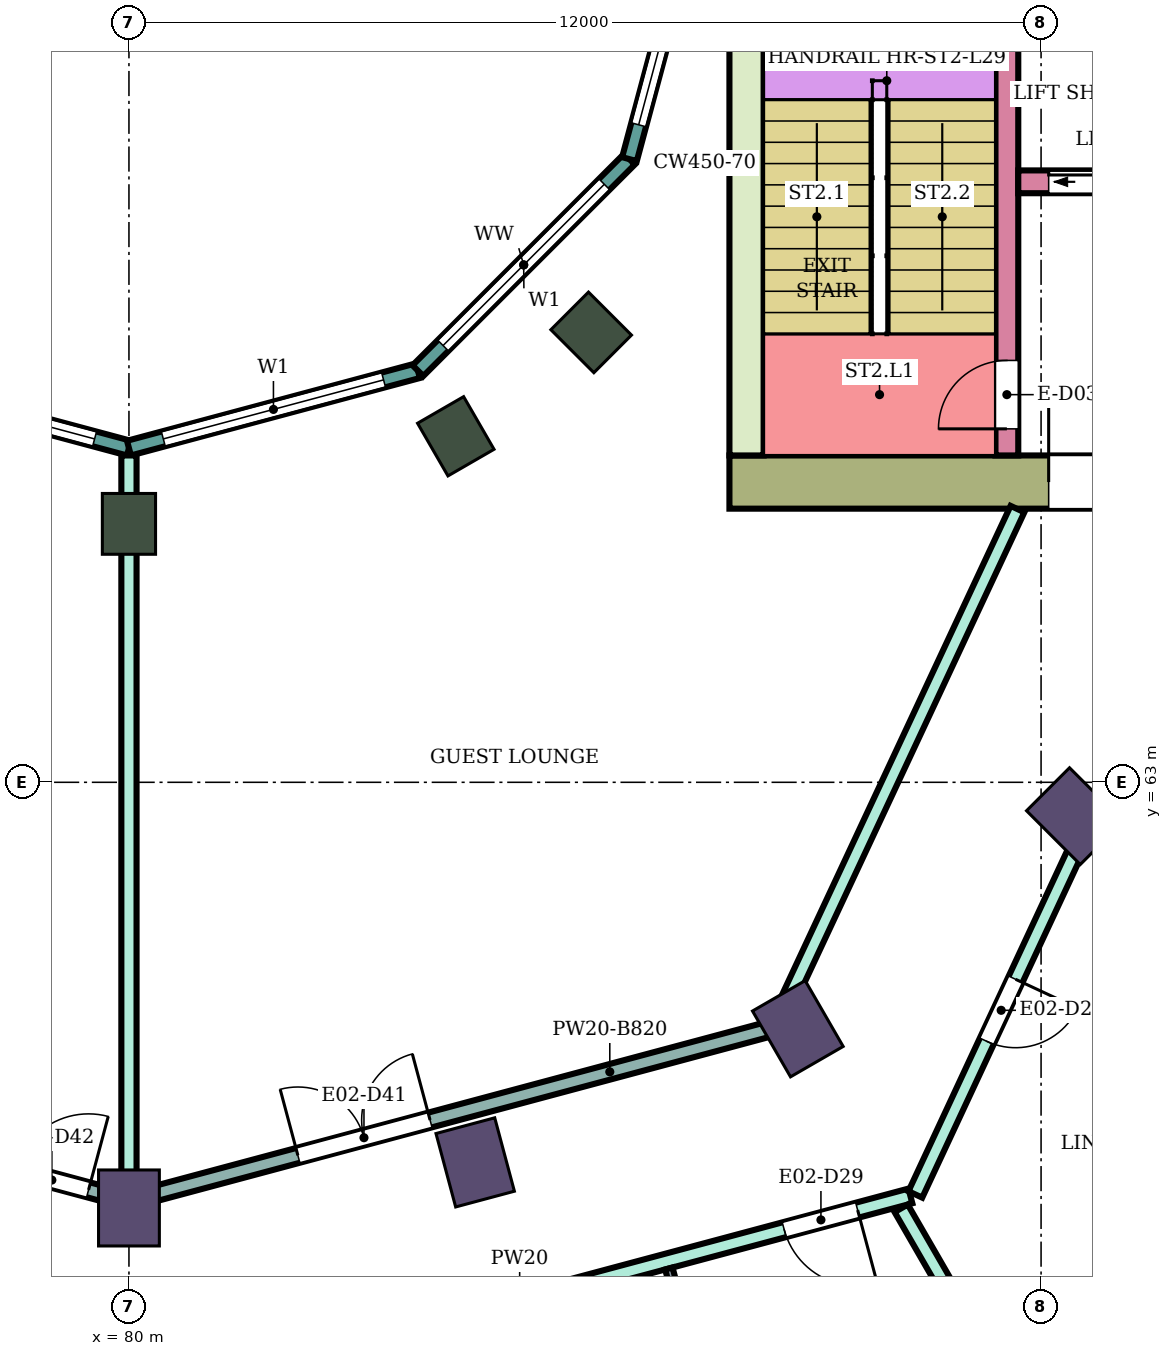
"""IFC4 building model, lengths in metres.
Left out: names, types, materials, properties, quantities, classifications, styles, units other than length and angle.
Written with IfcOpenShell. Run it as: python <this file> out.ifc"""

import sys

from ifc_helpers import new_model, si_unit, direction, frame, frame_2d, origin, origin_2d, place, context, subcontext, project, spatial, rectangle, extrude, element, fill, save


model = new_model("IFC4")
c1 = context("Model", 3, precision=1e-05, world=origin(), true_north=direction((0.0, 1.0)))
c2 = subcontext(c1, "Body", "Model", "MODEL_VIEW")
j1 = project(units=[si_unit("LENGTHUNIT", "METRE"), si_unit("PLANEANGLEUNIT", "RADIAN")], contexts=[c1])
p1 = place(None, origin())
s1 = spatial("IfcSite", under=j1, at=p1, CompositionType="ELEMENT")
p2 = place(p1, origin())
s2 = spatial("IfcBuilding", under=s1, at=p2, CompositionType="ELEMENT")
p3 = place(p2, frame((0.0, 0.0, 126.3)))
s3 = spatial("IfcBuildingStorey", under=s2, at=p3, CompositionType="ELEMENT", Elevation=126.3)
for number, where, z_axis, x_axis in (
    (1, (80.0, 57.4, 0.0), (0.0, 0.0, 1.0), (0.0, -1.0, 0.0)),
    (2, (84.555, 58.0, 0.0), (0.0, 0.0, 1.0), (0.259, -0.966, 0.0)),
    (3, (88.8, 59.758, 0.0), (0.0, 0.0, 1.0), (0.5, -0.866, 0.0)),
    (4, (92.445, 62.555, 0.0), (0.0, 0.0, 1.0), (0.707, -0.707, 0.0)),
):
    element("IfcColumn", number, at=place(p3, frame(where, z_axis=z_axis, x_axis=x_axis)), inside=s3, PredefinedType="COLUMN", context=c2, shape_type="SweptSolid", body=[
        extrude(rectangle(XDim=1.0, YDim=0.8, at=origin_2d()), origin(), (0.0, 0.0, 1.0), 3.9),
    ])
for number, where, z_axis, x_axis in (
    (5, (80.0, 66.4, 0.0), (0.0, 0.0, 1.0), (0.0, -1.0, 0.0)),
    (6, (84.3, 67.552, 0.0), (0.0, 0.0, 1.0), (0.5, -0.866, 0.0)),
    (7, (86.081, 68.919, 0.0), (0.0, 0.0, 1.0), (0.707, -0.707, 0.0)),
):
    element("IfcColumn", number, at=place(p3, frame(where, z_axis=z_axis, x_axis=x_axis)), inside=s3, PredefinedType="COLUMN", context=c2, shape_type="SweptSolid", body=[
        extrude(rectangle(XDim=0.8, YDim=0.7, at=origin_2d()), origin(), (0.0, 0.0, 1.0), 3.9),
    ])
p4 = place(p3, frame((87.9, 66.95, 0.0), z_axis=(0.0, 0.0, 1.0), x_axis=(1.0, 0.0, 0.0)))
e8 = element("IfcWall", 8, at=p4, inside=s3, PredefinedType="SHEAR", context=c2, shape_type="SweptSolid", body=[
    extrude(rectangle(XDim=14.8, YDim=0.7, at=frame_2d((7.4, 0.0))), origin(), (0.0, 0.0, 1.0), 3.58),
])
p5 = place(p4, frame((4.2, 0.0, 0.0)))
e9 = element("IfcOpeningElement", 9, at=p5, cuts=e8, PredefinedType="OPENING", context=c2, shape_type="SweptSolid", body=[
    extrude(rectangle(XDim=2.4, YDim=2.4, at=frame_2d((1.2, 1.2))), frame((0.0, 0.36, 0.0), z_axis=(0.0, -1.0, 0.0), x_axis=(1.0, 0.0, 0.0)), (0.0, 0.0, 1.0), 0.72),
])
p6 = place(p3, frame((88.125, 67.3, 0.0), z_axis=(0.0, 0.0, 1.0), x_axis=(0.0, 1.0, 0.0)))
e10 = element("IfcWall", 10, at=p6, inside=s3, PredefinedType="SHEAR", context=c2, shape_type="SweptSolid", body=[
    extrude(rectangle(XDim=7.7, YDim=0.45, at=frame_2d((3.85, 0.0))), origin(), (0.0, 0.0, 1.0), 3.58),
])
p7 = place(p3, frame((91.55, 67.3, 0.0), z_axis=(0.0, 0.0, 1.0), x_axis=(0.0, 1.0, 0.0)))
e11 = element("IfcWall", 11, at=p7, inside=s3, PredefinedType="SHEAR", context=c2, shape_type="SweptSolid", body=[
    extrude(rectangle(XDim=7.7, YDim=0.3, at=frame_2d((3.85, 0.0))), origin(), (0.0, 0.0, 1.0), 3.58),
])
p8 = place(p7, frame((0.35, 0.0, 0.0)))
e12 = element("IfcOpeningElement", 12, at=p8, cuts=e11, PredefinedType="OPENING", context=c2, shape_type="SweptSolid", body=[
    extrude(rectangle(XDim=0.9, YDim=2.1, at=frame_2d((0.45, 1.05))), frame((0.0, 0.16, 0.0), z_axis=(0.0, -1.0, 0.0), x_axis=(1.0, 0.0, 0.0)), (0.0, 0.0, 1.0), 0.32),
])
p9 = place(p3, frame((91.7, 70.9, 0.0), z_axis=(0.0, 0.0, 1.0), x_axis=(1.0, 0.0, 0.0)))
e13 = element("IfcWall", 13, at=p9, inside=s3, PredefinedType="SHEAR", context=c2, shape_type="SweptSolid", body=[
    extrude(rectangle(XDim=11.0, YDim=0.3, at=frame_2d((5.5, 0.0))), origin(), (0.0, 0.0, 1.0), 3.58),
])
p10 = place(p9, frame((0.4, 0.0, 0.0)))
e14 = element("IfcOpeningElement", 14, at=p10, cuts=e13, PredefinedType="OPENING", context=c2, shape_type="SweptSolid", body=[
    extrude(rectangle(XDim=1.4, YDim=2.1, at=frame_2d((0.7, 1.05))), frame((0.0, 0.16, 0.0), z_axis=(0.0, -1.0, 0.0), x_axis=(1.0, 0.0, 0.0)), (0.0, 0.0, 1.0), 0.32),
])
p11 = place(p9, frame((5.4, 0.0, 0.0)))
e15 = element("IfcOpeningElement", 15, at=p11, cuts=e13, PredefinedType="OPENING", context=c2, shape_type="SweptSolid", body=[
    extrude(rectangle(XDim=1.4, YDim=2.1, at=frame_2d((0.7, 1.05))), frame((0.0, 0.16, 0.0), z_axis=(0.0, -1.0, 0.0), x_axis=(1.0, 0.0, 0.0)), (0.0, 0.0, 1.0), 0.32),
])
p12 = place(p9, frame((8.1, 0.0, 0.0)))
e16 = element("IfcOpeningElement", 16, at=p12, cuts=e13, PredefinedType="OPENING", context=c2, shape_type="SweptSolid", body=[
    extrude(rectangle(XDim=1.0, YDim=2.1, at=frame_2d((0.5, 1.05))), frame((0.0, 0.16, 0.0), z_axis=(0.0, -1.0, 0.0), x_axis=(1.0, 0.0, 0.0)), (0.0, 0.0, 1.0), 0.32),
])
p13 = place(p3, frame((76.198, 68.415, 0.0), z_axis=(0.0, 0.0, 1.0), x_axis=(0.965933654434, -0.258789828301, 0.0)))
e17 = element("IfcWall", 17, at=p13, inside=s3, PredefinedType="NOTDEFINED", context=c2, shape_type="SweptSolid", body=[
    extrude(rectangle(XDim=3.936, YDim=0.2, at=frame_2d((1.968, 0.0))), origin(), (0.0, 0.0, 1.0), 3.9),
])
p14 = place(p13, frame((0.468, 0.0, 0.9)))
e18 = element("IfcOpeningElement", 18, at=p14, cuts=e17, PredefinedType="OPENING", context=c2, shape_type="SweptSolid", body=[
    extrude(rectangle(XDim=3.0, YDim=2.3, at=frame_2d((1.5, 1.15))), frame((0.0, 0.11, 0.0), z_axis=(0.0, -1.0, 0.0), x_axis=(1.0, 0.0, 0.0)), (0.0, 0.0, 1.0), 0.22),
])
p15 = place(p3, frame((80.0, 67.396, 0.0), z_axis=(0.0, 0.0, 1.0), x_axis=(0.965933654434, 0.258789828301, 0.0)))
e19 = element("IfcWall", 19, at=p15, inside=s3, PredefinedType="NOTDEFINED", context=c2, shape_type="SweptSolid", body=[
    extrude(rectangle(XDim=3.936, YDim=0.2, at=frame_2d((1.968, 0.0))), origin(), (0.0, 0.0, 1.0), 3.9),
])
p16 = place(p15, frame((0.468, 0.0, 0.9)))
e20 = element("IfcOpeningElement", 20, at=p16, cuts=e19, PredefinedType="OPENING", context=c2, shape_type="SweptSolid", body=[
    extrude(rectangle(XDim=3.0, YDim=2.3, at=frame_2d((1.5, 1.15))), frame((0.0, 0.11, 0.0), z_axis=(0.0, -1.0, 0.0), x_axis=(1.0, 0.0, 0.0)), (0.0, 0.0, 1.0), 0.22),
])
p17 = place(p3, frame((83.802, 68.415, 0.0), z_axis=(0.0, 0.0, 1.0), x_axis=(0.707106781187, 0.707106781187, 0.0)))
e21 = element("IfcWall", 21, at=p17, inside=s3, PredefinedType="NOTDEFINED", context=c2, shape_type="SweptSolid", body=[
    extrude(rectangle(XDim=3.936, YDim=0.2, at=frame_2d((1.968, 0.0))), origin(), (0.0, 0.0, 1.0), 3.9),
])
p18 = place(p17, frame((0.468, 0.0, 0.9)))
e22 = element("IfcOpeningElement", 22, at=p18, cuts=e21, PredefinedType="OPENING", context=c2, shape_type="SweptSolid", body=[
    extrude(rectangle(XDim=3.0, YDim=2.3, at=frame_2d((1.5, 1.15))), frame((0.0, 0.11, 0.0), z_axis=(0.0, -1.0, 0.0), x_axis=(1.0, 0.0, 0.0)), (0.0, 0.0, 1.0), 0.22),
])
p19 = place(p3, frame((86.585, 71.198, 0.0), z_axis=(0.0, 0.0, 1.0), x_axis=(0.258789828301, 0.965933654434, 0.0)))
e23 = element("IfcWall", 23, at=p19, inside=s3, PredefinedType="NOTDEFINED", context=c2, shape_type="SweptSolid", body=[
    extrude(rectangle(XDim=3.936, YDim=0.2, at=frame_2d((1.968, 0.0))), origin(), (0.0, 0.0, 1.0), 3.9),
])
p20 = place(p19, frame((0.468, 0.0, 0.9)))
e24 = element("IfcOpeningElement", 24, at=p20, cuts=e23, PredefinedType="OPENING", context=c2, shape_type="SweptSolid", body=[
    extrude(rectangle(XDim=3.0, YDim=2.3, at=frame_2d((1.5, 1.15))), frame((0.0, 0.11, 0.0), z_axis=(0.0, -1.0, 0.0), x_axis=(1.0, 0.0, 0.0)), (0.0, 0.0, 1.0), 0.22),
])
p21 = place(p3, frame((69.652, 57.578, 0.0), z_axis=(0.0, 0.0, 1.0), x_axis=(0.965851674805, -0.259095623807, 0.0)))
e25 = element("IfcWall", 25, at=p21, inside=s3, PredefinedType="PARTITIONING", context=c2, shape_type="SweptSolid", body=[
    extrude(rectangle(XDim=10.623, YDim=0.2, at=frame_2d((5.312, 0.0))), origin(), (0.0, 0.0, 1.0), 3.45),
])
p22 = place(p21, frame((9.163, 0.0, 0.0)))
e26 = element("IfcOpeningElement", 26, at=p22, cuts=e25, PredefinedType="OPENING", context=c2, shape_type="SweptSolid", body=[
    extrude(rectangle(XDim=1.0, YDim=2.1, at=frame_2d((0.5, 1.05))), frame((0.0, 0.11, 0.0), z_axis=(0.0, -1.0, 0.0), x_axis=(1.0, 0.0, 0.0)), (0.0, 0.0, 1.0), 0.22),
])
p23 = place(p3, frame((71.498, 59.774, 0.0), z_axis=(0.0, 0.0, 1.0), x_axis=(0.965912232838, -0.258869771225, 0.0)))
e27 = element("IfcWall", 27, at=p23, inside=s3, PredefinedType="PARTITIONING", context=c2, shape_type="SweptSolid", body=[
    extrude(rectangle(XDim=8.672, YDim=0.2, at=frame_2d((4.336, 0.0))), origin(), (0.0, 0.0, 1.0), 3.08),
])
p24 = place(p23, frame((7.252, 0.0, 0.0)))
e28 = element("IfcOpeningElement", 28, at=p24, cuts=e27, PredefinedType="OPENING", context=c2, shape_type="SweptSolid", body=[
    extrude(rectangle(XDim=1.0, YDim=2.1, at=frame_2d((0.5, 1.05))), frame((0.0, 0.11, 0.0), z_axis=(0.0, -1.0, 0.0), x_axis=(1.0, 0.0, 0.0)), (0.0, 0.0, 1.0), 0.22),
])
p25 = place(p3, frame((80.0, 54.805, 0.0), z_axis=(0.0, 0.0, 1.0), x_axis=(0.965967909695, 0.258661936588, 0.0)))
e29 = element("IfcWall", 29, at=p25, inside=s3, PredefinedType="PARTITIONING", context=c2, shape_type="SweptSolid", body=[
    extrude(rectangle(XDim=10.643, YDim=0.2, at=frame_2d((5.322, 0.0))), origin(), (0.0, 0.0, 1.0), 3.45),
])
p26 = place(p25, frame((8.925, 0.0, 0.0)))
e30 = element("IfcOpeningElement", 30, at=p26, cuts=e29, PredefinedType="OPENING", context=c2, shape_type="SweptSolid", body=[
    extrude(rectangle(XDim=1.0, YDim=2.1, at=frame_2d((0.5, 1.05))), frame((0.0, 0.11, 0.0), z_axis=(0.0, -1.0, 0.0), x_axis=(1.0, 0.0, 0.0)), (0.0, 0.0, 1.0), 0.22),
])
p27 = place(p25, frame((2.123, 0.0, 0.0)))
e31 = element("IfcOpeningElement", 31, at=p27, cuts=e29, PredefinedType="OPENING", context=c2, shape_type="SweptSolid", body=[
    extrude(rectangle(XDim=1.0, YDim=2.1, at=frame_2d((0.5, 1.05))), frame((0.0, 0.11, 0.0), z_axis=(0.0, -1.0, 0.0), x_axis=(1.0, 0.0, 0.0)), (0.0, 0.0, 1.0), 0.22),
])
p28 = place(p3, frame((80.0, 57.627, 0.0), z_axis=(0.0, 0.0, 1.0), x_axis=(0.0, 1.0, 0.0)))
e32 = element("IfcWall", 32, at=p28, inside=s3, PredefinedType="PARTITIONING", context=c2, shape_type="SweptSolid", body=[
    extrude(rectangle(XDim=9.673, YDim=0.2, at=frame_2d((4.836, 0.0))), origin(), (0.0, 0.0, 1.0), 3.45),
])
p29 = place(p3, frame((80.001, 57.496, 0.0), z_axis=(0.0, 0.0, 1.0), x_axis=(0.965924211089, 0.258825073035, 0.0)))
e33 = element("IfcWall", 33, at=p29, inside=s3, PredefinedType="PARTITIONING", context=c2, shape_type="SweptSolid", body=[
    extrude(rectangle(XDim=8.731, YDim=0.2, at=frame_2d((4.365, 0.0))), origin(), (0.0, 0.0, 1.0), 3.08),
])
p30 = place(p29, frame((2.3, 0.0, 0.0)))
e34 = element("IfcOpeningElement", 34, at=p30, cuts=e33, PredefinedType="OPENING", context=c2, shape_type="SweptSolid", body=[
    extrude(rectangle(XDim=1.8, YDim=2.1, at=frame_2d((0.9, 1.05))), frame((0.0, 0.11, 0.0), z_axis=(0.0, -1.0, 0.0), x_axis=(1.0, 0.0, 0.0)), (0.0, 0.0, 1.0), 0.22),
])
p31 = place(p3, frame((88.502, 59.774, 0.0), z_axis=(0.0, 0.0, 1.0), x_axis=(0.423423307095, 0.905931952747, 0.0)))
e35 = element("IfcWall", 35, at=p31, inside=s3, PredefinedType="PARTITIONING", context=c2, shape_type="SweptSolid", body=[
    extrude(rectangle(XDim=7.529, YDim=0.2, at=frame_2d((3.764, 0.0))), origin(), (0.0, 0.0, 1.0), 3.45),
])
p32 = place(p3, frame((90.16, 57.396, 0.0), z_axis=(0.0, 0.0, 1.0), x_axis=(0.499848624781, -0.86611278267, 0.0)))
e36 = element("IfcWall", 36, at=p32, inside=s3, PredefinedType="PARTITIONING", context=c2, shape_type="SweptSolid", body=[
    extrude(rectangle(XDim=5.472, YDim=0.2, at=frame_2d((2.736, 0.0))), origin(), (0.0, 0.0, 1.0), 3.45),
])
p33 = place(p3, frame((90.346, 57.578, 0.0), z_axis=(0.0, 0.0, 1.0), x_axis=(0.422476720533, 0.906373775331, 0.0)))
e37 = element("IfcWall", 37, at=p33, inside=s3, PredefinedType="PARTITIONING", context=c2, shape_type="SweptSolid", body=[
    extrude(rectangle(XDim=8.208, YDim=0.2, at=frame_2d((4.104, 0.0))), origin(), (0.0, 0.0, 1.0), 3.45),
])
p34 = place(p33, frame((2.223, 0.0, 0.0)))
e38 = element("IfcOpeningElement", 38, at=p34, cuts=e37, PredefinedType="OPENING", context=c2, shape_type="SweptSolid", body=[
    extrude(rectangle(XDim=0.9, YDim=2.1, at=frame_2d((0.45, 1.05))), frame((0.0, 0.11, 0.0), z_axis=(0.0, -1.0, 0.0), x_axis=(1.0, 0.0, 0.0)), (0.0, 0.0, 1.0), 0.22),
])
p35 = place(p3, frame((92.692, 62.303, 0.0), z_axis=(0.0, 0.0, 1.0), x_axis=(0.706943936447, -0.707269588432, 0.0)))
e39 = element("IfcWall", 39, at=p35, inside=s3, PredefinedType="PARTITIONING", context=c2, shape_type="SweptSolid", body=[
    extrude(rectangle(XDim=5.248, YDim=0.2, at=frame_2d((2.624, 0.0))), origin(), (0.0, 0.0, 1.0), 3.45),
])
p36 = place(p3, frame((87.103, 56.604, 0.0), z_axis=(0.0, 0.0, 1.0), x_axis=(0.258883730688, -0.965908491517, 0.0)))
e40 = element("IfcWall", 40, at=p36, inside=s3, PredefinedType="PARTITIONING", context=c2, shape_type="SweptSolid", body=[
    extrude(rectangle(XDim=2.7, YDim=0.1, at=frame_2d((1.35, 0.0))), origin(), (0.0, 0.0, 1.0), 3.45),
])
p37 = place(p36, frame((0.9, 0.0, 0.0)))
e41 = element("IfcOpeningElement", 41, at=p37, cuts=e40, PredefinedType="OPENING", context=c2, shape_type="SweptSolid", body=[
    extrude(rectangle(XDim=0.8, YDim=2.1, at=frame_2d((0.4, 1.05))), frame((0.0, 0.06, 0.0), z_axis=(0.0, -1.0, 0.0), x_axis=(1.0, 0.0, 0.0)), (0.0, 0.0, 1.0), 0.12),
])
p38 = place(p3, frame((92.477, 53.619, 0.0), z_axis=(0.0, 0.0, 1.0), x_axis=(0.421913254756, 0.90663620348, 0.0)))
e42 = element("IfcWall", 42, at=p38, inside=s3, PredefinedType="PARTITIONING", context=c2, shape_type="SweptSolid", body=[
    extrude(rectangle(XDim=6.573, YDim=0.1, at=frame_2d((3.287, 0.0))), origin(), (0.0, 0.0, 1.0), 2.68),
])
p39 = place(p38, frame((2.831, 0.0, 0.0)))
e43 = element("IfcOpeningElement", 43, at=p39, cuts=e42, PredefinedType="OPENING", context=c2, shape_type="SweptSolid", body=[
    extrude(rectangle(XDim=0.9, YDim=2.1, at=frame_2d((0.45, 1.05))), frame((0.0, 0.06, 0.0), z_axis=(0.0, -1.0, 0.0), x_axis=(1.0, 0.0, 0.0)), (0.0, 0.0, 1.0), 0.12),
])
p40 = place(p14, origin())
e44 = element("IfcWindow", 44, at=p40, inside=s3, PartitioningType="SINGLE_PANEL", PredefinedType="WINDOW", context=c2, shape_type="SweptSolid", body=[
    extrude(rectangle(XDim=3.0, YDim=2.3, at=frame_2d((1.5, 1.15))), frame((0.0, 0.03, 0.0), z_axis=(0.0, -1.0, 0.0), x_axis=(1.0, 0.0, 0.0)), (0.0, 0.0, 1.0), 0.06),
])
fill(e18, e44)
p41 = place(p16, origin())
e45 = element("IfcWindow", 45, at=p41, inside=s3, PartitioningType="SINGLE_PANEL", PredefinedType="WINDOW", context=c2, shape_type="SweptSolid", body=[
    extrude(rectangle(XDim=3.0, YDim=2.3, at=frame_2d((1.5, 1.15))), frame((0.0, 0.03, 0.0), z_axis=(0.0, -1.0, 0.0), x_axis=(1.0, 0.0, 0.0)), (0.0, 0.0, 1.0), 0.06),
])
fill(e20, e45)
p42 = place(p18, origin())
e46 = element("IfcWindow", 46, at=p42, inside=s3, PartitioningType="SINGLE_PANEL", PredefinedType="WINDOW", context=c2, shape_type="SweptSolid", body=[
    extrude(rectangle(XDim=3.0, YDim=2.3, at=frame_2d((1.5, 1.15))), frame((0.0, 0.03, 0.0), z_axis=(0.0, -1.0, 0.0), x_axis=(1.0, 0.0, 0.0)), (0.0, 0.0, 1.0), 0.06),
])
fill(e22, e46)
p43 = place(p20, origin())
e47 = element("IfcWindow", 47, at=p43, inside=s3, PartitioningType="SINGLE_PANEL", PredefinedType="WINDOW", context=c2, shape_type="SweptSolid", body=[
    extrude(rectangle(XDim=3.0, YDim=2.3, at=frame_2d((1.5, 1.15))), frame((0.0, 0.03, 0.0), z_axis=(0.0, -1.0, 0.0), x_axis=(1.0, 0.0, 0.0)), (0.0, 0.0, 1.0), 0.06),
])
fill(e24, e47)
p44 = place(p34, frame((0.9, 0.0, 0.0), z_axis=(0.0, 0.0, 1.0), x_axis=(-1.0, 0.0, 0.0)))
e48 = element("IfcDoor", 48, at=p44, inside=s3, OperationType="SINGLE_SWING_LEFT", PredefinedType="DOOR", context=c2, shape_type="SweptSolid", body=[
    extrude(rectangle(XDim=0.9, YDim=2.1, at=frame_2d((0.45, 1.05))), frame((0.0, 0.025, 0.0), z_axis=(0.0, -1.0, 0.0), x_axis=(1.0, 0.0, 0.0)), (0.0, 0.0, 1.0), 0.05),
])
fill(e38, e48)
p45 = place(p26, frame((1.0, 0.0, 0.0), z_axis=(0.0, 0.0, 1.0), x_axis=(-1.0, 0.0, 0.0)))
e49 = element("IfcDoor", 49, at=p45, inside=s3, OperationType="SINGLE_SWING_LEFT", PredefinedType="DOOR", context=c2, shape_type="SweptSolid", body=[
    extrude(rectangle(XDim=1.0, YDim=2.1, at=frame_2d((0.5, 1.05))), frame((0.0, 0.025, 0.0), z_axis=(0.0, -1.0, 0.0), x_axis=(1.0, 0.0, 0.0)), (0.0, 0.0, 1.0), 0.05),
])
fill(e30, e49)
p46 = place(p30, origin())
e50 = element("IfcDoor", 50, at=p46, inside=s3, OperationType="DOUBLE_DOOR_SINGLE_SWING", PredefinedType="DOOR", context=c2, shape_type="SweptSolid", body=[
    extrude(rectangle(XDim=1.8, YDim=2.1, at=frame_2d((0.9, 1.05))), frame((0.0, 0.025, 0.0), z_axis=(0.0, -1.0, 0.0), x_axis=(1.0, 0.0, 0.0)), (0.0, 0.0, 1.0), 0.05),
])
fill(e34, e50)
p47 = place(p24, origin())
e51 = element("IfcDoor", 51, at=p47, inside=s3, OperationType="SINGLE_SWING_RIGHT", PredefinedType="DOOR", context=c2, shape_type="SweptSolid", body=[
    extrude(rectangle(XDim=1.0, YDim=2.1, at=frame_2d((0.5, 1.05))), frame((0.0, 0.025, 0.0), z_axis=(0.0, -1.0, 0.0), x_axis=(1.0, 0.0, 0.0)), (0.0, 0.0, 1.0), 0.05),
])
fill(e28, e51)
p48 = place(p8, origin())
e52 = element("IfcDoor", 52, at=p48, inside=s3, OperationType="SINGLE_SWING_LEFT", PredefinedType="DOOR", context=c2, shape_type="SweptSolid", body=[
    extrude(rectangle(XDim=0.9, YDim=2.1, at=frame_2d((0.45, 1.05))), frame((0.0, 0.025, 0.0), z_axis=(0.0, -1.0, 0.0), x_axis=(1.0, 0.0, 0.0)), (0.0, 0.0, 1.0), 0.05),
])
fill(e12, e52)
p49 = place(p10, origin())
e53 = element("IfcDoor", 53, at=p49, inside=s3, OperationType="DOUBLE_DOOR_SLIDING", PredefinedType="DOOR", context=c2, shape_type="SweptSolid", body=[
    extrude(rectangle(XDim=1.4, YDim=2.1, at=frame_2d((0.7, 1.05))), frame((0.0, 0.025, 0.0), z_axis=(0.0, -1.0, 0.0), x_axis=(1.0, 0.0, 0.0)), (0.0, 0.0, 1.0), 0.05),
])
fill(e14, e53)
p50 = place(p5, origin())
e54 = element("IfcDoor", 54, at=p50, inside=s3, OperationType="DOUBLE_DOOR_SINGLE_SWING", PredefinedType="DOOR", context=c2, shape_type="SweptSolid", body=[
    extrude(rectangle(XDim=2.4, YDim=2.4, at=frame_2d((1.2, 1.2))), frame((0.0, 0.025, 0.0), z_axis=(0.0, -1.0, 0.0), x_axis=(1.0, 0.0, 0.0)), (0.0, 0.0, 1.0), 0.05),
])
fill(e9, e54)
save(model, sys.argv[1])
